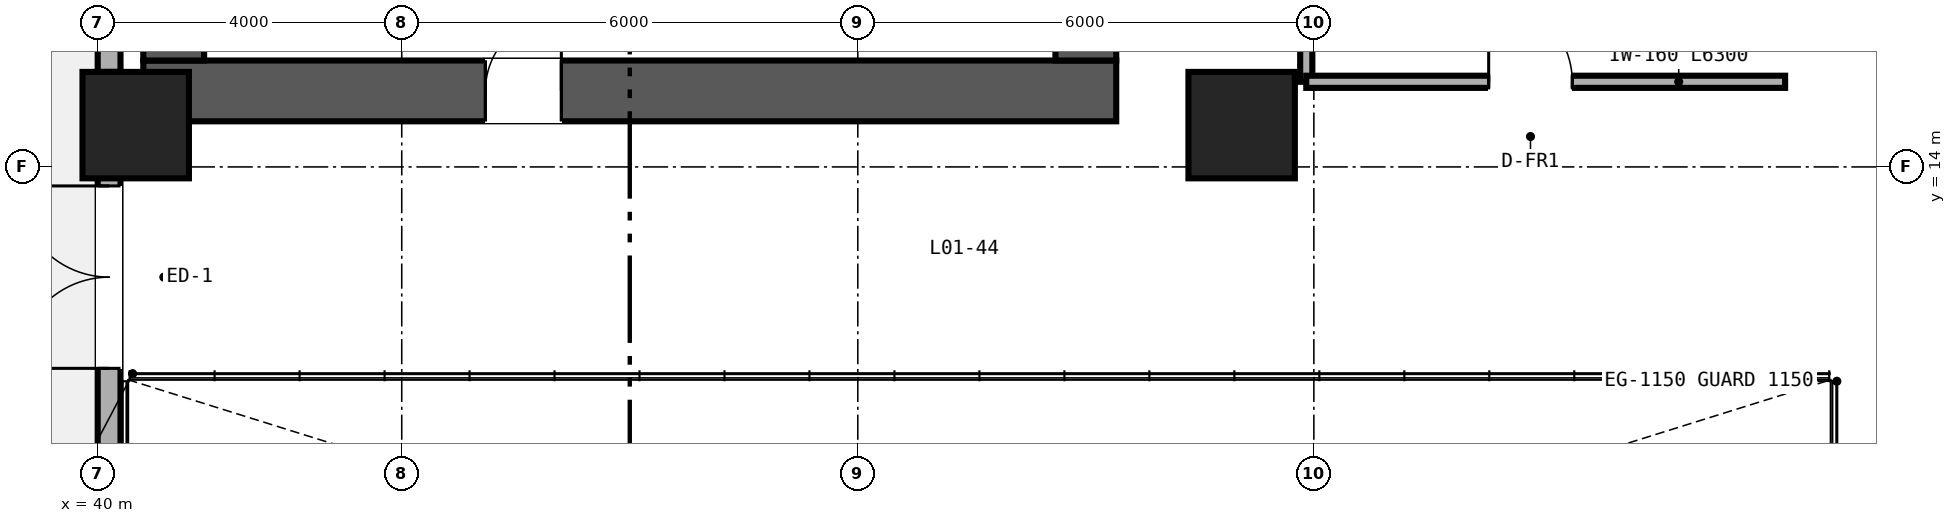
"""IFC4 building model, lengths in metres.
Left out: names, types, materials, properties, quantities, classifications, styles, units other than length and angle.
Written with IfcOpenShell. Run it as: python <this file> out.ifc"""

import sys

from ifc_helpers import new_model, si_unit, direction, frame, frame_2d, origin, origin_2d, place, context, subcontext, project, spatial, rectangle, extrude, source, transform, mapped, element, fill, save


model = new_model("IFC4")
c1 = context("Model", 3, precision=1e-05, world=origin(), true_north=direction((0.0, 1.0)))
c2 = subcontext(c1, "Body", "Model", "MODEL_VIEW")
j1 = project(units=[si_unit("LENGTHUNIT", "METRE"), si_unit("PLANEANGLEUNIT", "RADIAN")], contexts=[c1])
p1 = place(None, origin())
s1 = spatial("IfcSite", under=j1, at=p1, CompositionType="ELEMENT")
p2 = place(p1, origin())
s2 = spatial("IfcBuilding", under=s1, at=p2, CompositionType="ELEMENT")
p3 = place(p2, origin())
s3 = spatial("IfcBuildingStorey", under=s2, at=p3, CompositionType="ELEMENT", Elevation=0.0)
p4 = place(p3, frame((40.6, 15.0, 0.0), z_axis=(0.0, 0.0, 1.0), x_axis=(1.0, 0.0, 0.0)))
e1 = element("IfcWall", 1, at=p4, inside=s3, PredefinedType="SHEAR", context=c2, shape_type="SweptSolid", body=[
    extrude(rectangle(XDim=12.8, YDim=0.8, at=frame_2d((6.4, 0.0))), origin(), (0.0, 0.0, 1.0), 5.71),
])
p5 = place(p4, frame((4.5, 0.0, 0.0)))
e2 = element("IfcOpeningElement", 2, at=p5, cuts=e1, PredefinedType="OPENING", context=c2, shape_type="SweptSolid", body=[
    extrude(rectangle(XDim=1.0, YDim=2.15, at=frame_2d((0.5, 1.075))), frame((0.0, 0.41, 0.0), z_axis=(0.0, -1.0, 0.0), x_axis=(1.0, 0.0, 0.0)), (0.0, 0.0, 1.0), 0.82),
])
p6 = place(p3, frame((41.0, 15.4, 0.0), z_axis=(0.0, 0.0, 1.0), x_axis=(0.0, 1.0, 0.0)))
e3 = element("IfcWall", 3, at=p6, inside=s3, PredefinedType="SHEAR", context=c2, shape_type="SweptSolid", body=[
    extrude(rectangle(XDim=21.2, YDim=0.8, at=frame_2d((10.6, 0.0))), origin(), (0.0, 0.0, 1.0), 5.71),
])
p7 = place(p3, frame((53.0, 15.4, 0.0), z_axis=(0.0, 0.0, 1.0), x_axis=(0.0, 1.0, 0.0)))
e4 = element("IfcWall", 4, at=p7, inside=s3, PredefinedType="SHEAR", context=c2, shape_type="SweptSolid", body=[
    extrude(rectangle(XDim=21.2, YDim=0.8, at=frame_2d((10.6, 0.0))), origin(), (0.0, 0.0, 1.0), 5.71),
])
p8 = place(p7, frame((16.15, 0.0, 0.0)))
e5 = element("IfcOpeningElement", 5, at=p8, cuts=e4, PredefinedType="OPENING", context=c2, shape_type="SweptSolid", body=[
    extrude(rectangle(XDim=1.1, YDim=2.15, at=frame_2d((0.55, 1.075))), frame((0.0, 0.41, 0.0), z_axis=(0.0, -1.0, 0.0), x_axis=(1.0, 0.0, 0.0)), (0.0, 0.0, 1.0), 0.82),
])
m1 = source(origin(), c2, "Body", "SweptSolid", [
    extrude(rectangle(XDim=1.4, YDim=1.4, at=origin_2d()), origin(), (0.0, 0.0, 1.0), 5.71),
])
for number, where, z_axis, x_axis in (
    (6, (40.5, 14.55, 0.0), (0.0, 0.0, 1.0), (1.0, 0.0, 0.0)),
    (7, (55.05, 14.55, 0.0), (0.0, 0.0, 1.0), (1.0, 0.0, 0.0)),
):
    element("IfcColumn", number, at=place(p3, frame(where, z_axis=z_axis, x_axis=x_axis)), inside=s3, PredefinedType="COLUMN", context=c2, shape_type="MappedRepresentation", body=[
        mapped(m1, transform((0.0, 0.0, 0.0), scale=1.0)),
    ])
p9 = place(p3, frame((40.15, 3.55, 0.0), z_axis=(0.0, 0.0, 1.0), x_axis=(0.0, 1.0, 0.0)))
e8 = element("IfcWall", 8, at=p9, inside=s3, PredefinedType="SOLIDWALL", context=c2, shape_type="SweptSolid", body=[
    extrude(rectangle(XDim=10.4, YDim=0.3, at=frame_2d((5.2, 0.0))), origin(), (0.0, 0.0, 1.0), 4.931),
])
p10 = place(p9, frame((7.8, 0.0, 0.0)))
e9 = element("IfcOpeningElement", 9, at=p10, cuts=e8, PredefinedType="OPENING", context=c2, shape_type="SweptSolid", body=[
    extrude(rectangle(XDim=2.4, YDim=2.6, at=frame_2d((1.2, 1.3))), frame((0.0, 0.16, 0.0), z_axis=(0.0, -1.0, 0.0), x_axis=(1.0, 0.0, 0.0)), (0.0, 0.0, 1.0), 0.32),
])
p11 = place(p3, frame((40.15, 15.25, 0.0), z_axis=(0.0, 0.0, 1.0), x_axis=(0.0, 1.0, 0.0)))
e10 = element("IfcWall", 10, at=p11, inside=s3, PredefinedType="SOLIDWALL", context=c2, shape_type="SweptSolid", body=[
    extrude(rectangle(XDim=12.2, YDim=0.3, at=frame_2d((6.1, 0.0))), origin(), (0.0, 0.0, 1.0), 4.931),
])
p12 = place(p3, frame((55.9, 15.12, 0.0), z_axis=(0.0, 0.0, 1.0), x_axis=(0.0, 1.0, 0.0)))
e11 = element("IfcWall", 11, at=p12, inside=s3, PredefinedType="PARTITIONING", context=c2, shape_type="SweptSolid", body=[
    extrude(rectangle(XDim=6.26, YDim=0.16, at=frame_2d((3.13, 0.0))), origin(), (0.0, 0.0, 1.0), 5.71),
])
p13 = place(p3, frame((55.9, 15.12, 0.0), z_axis=(0.0, 0.0, 1.0), x_axis=(1.0, 0.0, 0.0)))
e12 = element("IfcWall", 12, at=p13, inside=s3, PredefinedType="PARTITIONING", context=c2, shape_type="SweptSolid", body=[
    extrude(rectangle(XDim=6.3, YDim=0.16, at=frame_2d((3.15, 0.0))), origin(), (0.0, 0.0, 1.0), 5.71),
])
p14 = place(p13, frame((2.4, 0.0, 0.0)))
e13 = element("IfcOpeningElement", 13, at=p14, cuts=e12, PredefinedType="OPENING", context=c2, shape_type="SweptSolid", body=[
    extrude(rectangle(XDim=1.1, YDim=2.15, at=frame_2d((0.55, 1.075))), frame((0.0, 0.09, 0.0), z_axis=(0.0, -1.0, 0.0), x_axis=(1.0, 0.0, 0.0)), (0.0, 0.0, 1.0), 0.18),
])
m2 = source(origin(), c2, "Body", "SweptSolid", [
    extrude(rectangle(XDim=2.4, YDim=2.6, at=frame_2d((1.2, 1.3))), frame((0.0, 0.025, 0.0), z_axis=(0.0, -1.0, 0.0), x_axis=(1.0, 0.0, 0.0)), (0.0, 0.0, 1.0), 0.05),
])
p15 = place(p10, origin())
e14 = element("IfcDoor", 14, at=p15, inside=s3, OperationType="DOUBLE_DOOR_SINGLE_SWING", PredefinedType="DOOR", context=c2, shape_type="MappedRepresentation", body=[
    mapped(m2, transform((0.0, 0.0, 0.0), scale=1.0)),
])
fill(e9, e14)
m3 = source(origin(), c2, "Body", "SweptSolid", [
    extrude(rectangle(XDim=1.0, YDim=2.15, at=frame_2d((0.5, 1.075))), frame((0.0, 0.025, 0.0), z_axis=(0.0, -1.0, 0.0), x_axis=(1.0, 0.0, 0.0)), (0.0, 0.0, 1.0), 0.05),
])
p16 = place(p5, origin())
e15 = element("IfcDoor", 15, at=p16, inside=s3, OperationType="SINGLE_SWING_RIGHT", PredefinedType="DOOR", context=c2, shape_type="MappedRepresentation", body=[
    mapped(m3, transform((0.0, 0.0, 0.0), scale=1.0)),
])
fill(e2, e15)
m4 = source(origin(), c2, "Body", "SweptSolid", [
    extrude(rectangle(XDim=1.1, YDim=2.15, at=frame_2d((0.55, 1.075))), frame((0.0, 0.025, 0.0), z_axis=(0.0, -1.0, 0.0), x_axis=(1.0, 0.0, 0.0)), (0.0, 0.0, 1.0), 0.05),
])
p17 = place(p14, origin())
e16 = element("IfcDoor", 16, at=p17, inside=s3, OperationType="SINGLE_SWING_LEFT", PredefinedType="DOOR", context=c2, shape_type="MappedRepresentation", body=[
    mapped(m4, transform((0.0, 0.0, 0.0), scale=1.0)),
])
fill(e13, e16)
save(model, sys.argv[1])
